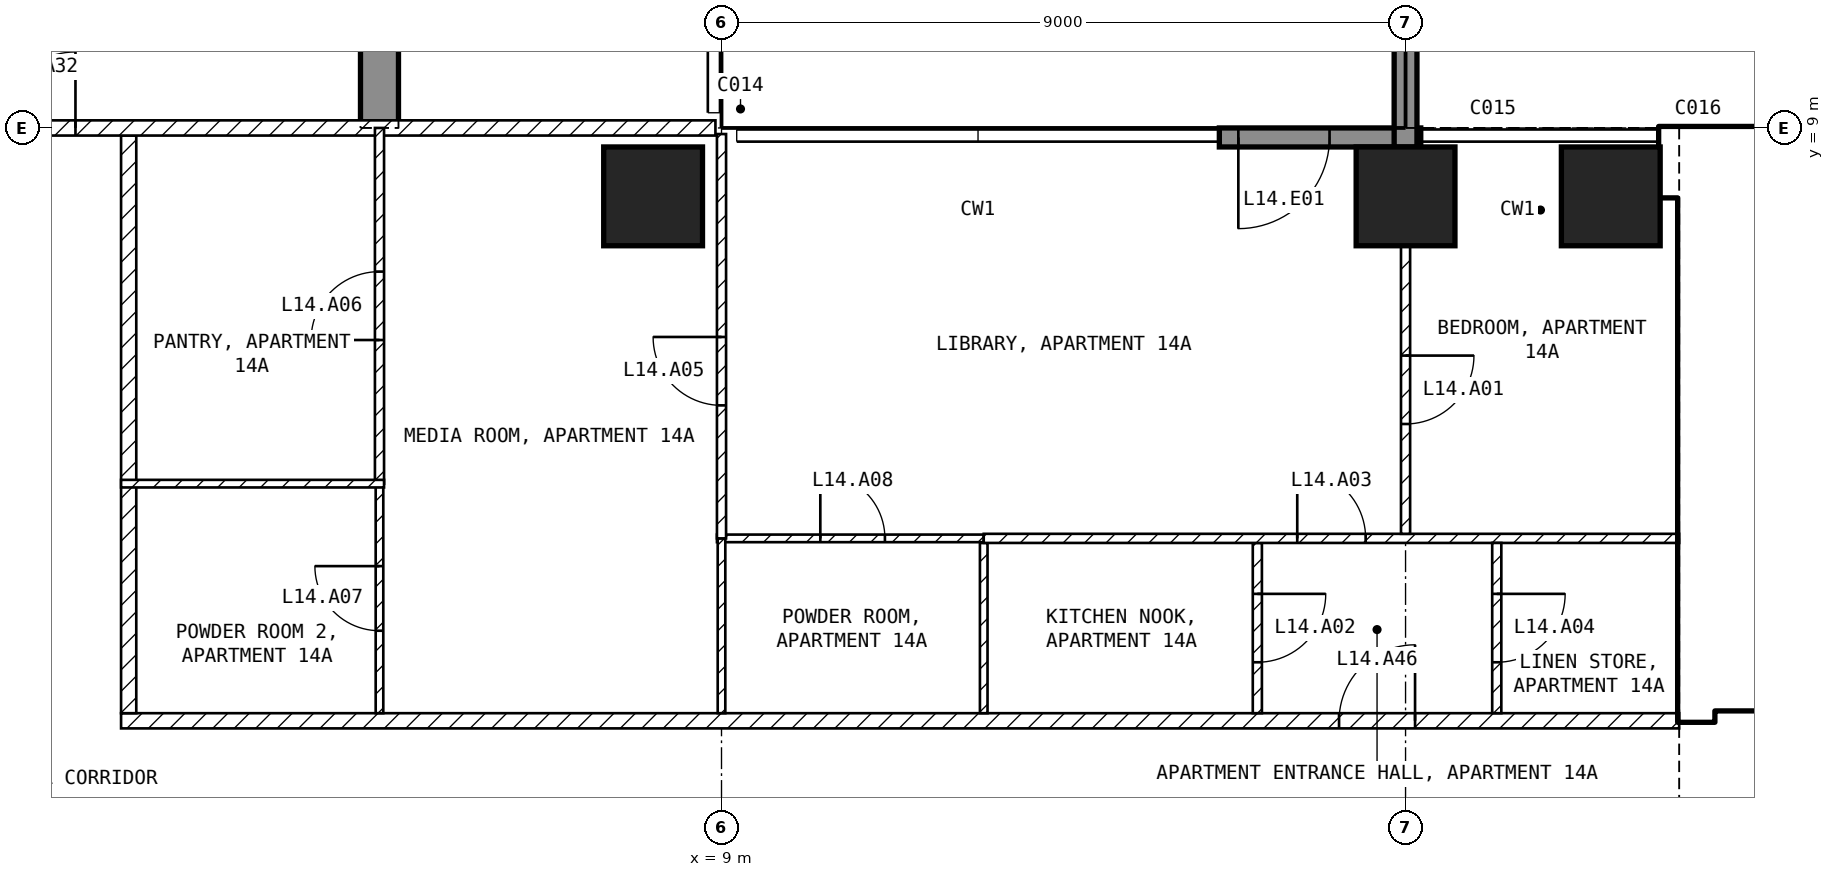
"""IFC4 building model, lengths in metres.
Left out: names, types, materials, properties, quantities, classifications, styles, units other than length and angle.
Written with IfcOpenShell. Run it as: python <this file> out.ifc"""

import sys

from ifc_helpers import new_model, si_unit, direction, frame, frame_2d, origin, origin_2d, place, context, subcontext, project, spatial, polyline, rectangle, outline, extrude, element, fill, save


model = new_model("IFC4")
c1 = context("Model", 3, precision=1e-05, world=origin(), true_north=direction((0.0, 1.0)))
c2 = subcontext(c1, "Body", "Model", "MODEL_VIEW")
j1 = project(units=[si_unit("LENGTHUNIT", "METRE"), si_unit("PLANEANGLEUNIT", "RADIAN")], contexts=[c1])
p1 = place(None, origin())
s1 = spatial("IfcSite", under=j1, at=p1, CompositionType="ELEMENT")
p2 = place(p1, origin())
s2 = spatial("IfcBuilding", under=s1, at=p2, CompositionType="ELEMENT")
p3 = place(p2, frame((0.0, 0.0, 68.0)))
s3 = spatial("IfcBuildingStorey", under=s2, at=p3, CompositionType="ELEMENT", Elevation=68.0)
for number, where, z_axis, x_axis in (
    (1, (8.1, 8.1, -0.25), (0.0, 0.0, 1.0), (1.0, 0.0, 0.0)),
    (2, (18.0, 8.1, -0.25), (0.0, 0.0, 1.0), (1.0, 0.0, 0.0)),
    (3, (20.7, 8.1, -0.25), (0.0, 0.0, 1.0), (1.0, 0.0, 0.0)),
):
    element("IfcColumn", number, at=place(p3, frame(where, z_axis=z_axis, x_axis=x_axis)), inside=s3, PredefinedType="COLUMN", context=c2, shape_type="SweptSolid", body=[
        extrude(rectangle(XDim=1.3, YDim=1.3, at=origin_2d()), origin(), (0.0, 0.0, 1.0), 3.5),
    ])
p4 = place(p3, frame((4.25, 9.0, -0.25), z_axis=(1.0, 0.0, 0.0), x_axis=(0.0, 1.0, 0.0)))
e4 = element("IfcWall", 4, at=p4, inside=s3, PredefinedType="SHEAR", context=c2, shape_type="SweptSolid", body=[
    extrude(outline(polyline([(0.0, 0.0), (2.1, 0.0), (2.1, 2.65), (4.5, 2.65), (4.5, 0.0), (9.9, 0.0), (9.9, 2.65), (12.3, 2.65), (12.3, 0.0), (16.45, 0.0), (16.45, 3.5), (0.0, 3.5), (0.0, 0.0)])), origin(), (0.0, 0.0, 1.0), 0.5),
])
p5 = place(p3, frame((18.2, 8.875, 0.0), z_axis=(0.0, 0.0, 1.0), x_axis=(-1.0, 0.0, 0.0)))
e5 = element("IfcWall", 5, at=p5, inside=s3, PredefinedType="SOLIDWALL", context=c2, shape_type="SweptSolid", body=[
    extrude(rectangle(XDim=2.65, YDim=0.25, at=frame_2d((1.325, 0.0))), origin(), (0.0, 0.0, 1.0), 3.25),
])
p6 = place(p5, frame((1.2, 0.0, 0.0)))
e6 = element("IfcOpeningElement", 6, at=p6, cuts=e5, PredefinedType="OPENING", context=c2, shape_type="SweptSolid", body=[
    extrude(rectangle(XDim=1.2, YDim=2.4, at=frame_2d((0.6, 1.2))), frame((0.0, 0.135, 0.0), z_axis=(0.0, -1.0, 0.0), x_axis=(1.0, 0.0, 0.0)), (0.0, 0.0, 1.0), 0.27),
])
p7 = place(p3, frame((18.0, 8.75, 0.0), z_axis=(0.0, 0.0, 1.0), x_axis=(0.0, 1.0, 0.0)))
e7 = element("IfcWall", 7, at=p7, inside=s3, PredefinedType="SOLIDWALL", context=c2, shape_type="SweptSolid", body=[
    extrude(rectangle(XDim=2.95, YDim=0.3, at=frame_2d((1.475, 0.0))), origin(), (0.0, 0.0, 1.0), 3.25),
])
p8 = place(p3, frame((21.35, 8.55, 0.0), z_axis=(0.0, 0.0, 1.0), x_axis=(1.0, 0.0, 0.0)))
e8 = element("IfcWall", 8, at=p8, inside=s3, PredefinedType="SHEAR", context=c2, shape_type="SweptSolid", body=[
    extrude(rectangle(XDim=10.15, YDim=0.9, at=frame_2d((5.075, 0.0))), origin(), (0.0, 0.0, 1.0), 3.25),
])
p9 = place(p3, frame((21.825, 1.2, 0.0), z_axis=(0.0, 0.0, 1.0), x_axis=(0.0, 1.0, 0.0)))
e9 = element("IfcWall", 9, at=p9, inside=s3, PredefinedType="SHEAR", context=c2, shape_type="SweptSolid", body=[
    extrude(rectangle(XDim=6.9, YDim=0.45, at=frame_2d((3.45, 0.0))), origin(), (0.0, 0.0, 1.0), 3.25),
])
p10 = place(p3, frame((22.05, 1.45, 0.0), z_axis=(0.0, 0.0, 1.0), x_axis=(1.0, 0.0, 0.0)))
e10 = element("IfcWall", 10, at=p10, inside=s3, PredefinedType="SOLIDWALL", context=c2, shape_type="SweptSolid", body=[
    extrude(rectangle(XDim=13.05, YDim=0.2, at=frame_2d((6.525, 0.0))), origin(), (0.0, 0.0, 1.0), 3.25),
])
p11 = place(p10, frame((0.75, 0.0, 0.0)))
e11 = element("IfcOpeningElement", 11, at=p11, cuts=e10, PredefinedType="OPENING", context=c2, shape_type="SweptSolid", body=[
    extrude(rectangle(XDim=1.0, YDim=2.1, at=frame_2d((0.5, 1.05))), frame((0.0, 0.11, 0.0), z_axis=(0.0, -1.0, 0.0), x_axis=(1.0, 0.0, 0.0)), (0.0, 0.0, 1.0), 0.22),
])
p12 = place(p10, frame((3.25, 0.0, 0.0)))
e12 = element("IfcOpeningElement", 12, at=p12, cuts=e10, PredefinedType="OPENING", context=c2, shape_type="SweptSolid", body=[
    extrude(rectangle(XDim=1.0, YDim=2.1, at=frame_2d((0.5, 1.05))), frame((0.0, 0.11, 0.0), z_axis=(0.0, -1.0, 0.0), x_axis=(1.0, 0.0, 0.0)), (0.0, 0.0, 1.0), 0.22),
])
p13 = place(p3, frame((22.05, 5.15, 0.0), z_axis=(0.0, 0.0, 1.0), x_axis=(1.0, 0.0, 0.0)))
e13 = element("IfcWall", 13, at=p13, inside=s3, PredefinedType="SOLIDWALL", context=c2, shape_type="SweptSolid", body=[
    extrude(rectangle(XDim=6.3, YDim=0.2, at=frame_2d((3.15, 0.0))), origin(), (0.0, 0.0, 1.0), 3.25),
])
p14 = place(p13, frame((0.2, 0.0, 0.0)))
e14 = element("IfcOpeningElement", 14, at=p14, cuts=e13, PredefinedType="OPENING", context=c2, shape_type="SweptSolid", body=[
    extrude(rectangle(XDim=1.0, YDim=2.1, at=frame_2d((0.5, 1.05))), frame((0.0, 0.11, 0.0), z_axis=(0.0, -1.0, 0.0), x_axis=(1.0, 0.0, 0.0)), (0.0, 0.0, 1.0), 0.22),
])
p15 = place(p3, frame((1.1, 1.2, 0.0), z_axis=(0.0, 0.0, 1.0), x_axis=(1.0, 0.0, 0.0)))
e15 = element("IfcWall", 15, at=p15, inside=s3, PredefinedType="PARTITIONING", context=c2, shape_type="SweptSolid", body=[
    extrude(rectangle(XDim=20.5, YDim=0.2, at=frame_2d((10.25, 0.0))), origin(), (0.0, 0.0, 1.0), 3.25),
])
p16 = place(p15, frame((16.025, 0.0, 0.0)))
e16 = element("IfcOpeningElement", 16, at=p16, cuts=e15, PredefinedType="OPENING", context=c2, shape_type="SweptSolid", body=[
    extrude(rectangle(XDim=1.0, YDim=2.1, at=frame_2d((0.5, 1.05))), frame((0.0, 0.11, 0.0), z_axis=(0.0, -1.0, 0.0), x_axis=(1.0, 0.0, 0.0)), (0.0, 0.0, 1.0), 0.22),
])
p17 = place(p3, frame((1.2, 8.9, 0.0), z_axis=(0.0, 0.0, 1.0), x_axis=(0.0, -1.0, 0.0)))
e17 = element("IfcWall", 17, at=p17, inside=s3, PredefinedType="PARTITIONING", context=c2, shape_type="SweptSolid", body=[
    extrude(rectangle(XDim=7.6, YDim=0.2, at=frame_2d((3.8, 0.0))), origin(), (0.0, 0.0, 1.0), 3.25),
])
p18 = place(p3, frame((-8.92, 9.0, 0.0), z_axis=(0.0, 0.0, 1.0), x_axis=(1.0, 0.0, 0.0)))
e18 = element("IfcWall", 18, at=p18, inside=s3, PredefinedType="PARTITIONING", context=c2, shape_type="SweptSolid", body=[
    extrude(rectangle(XDim=17.84, YDim=0.2, at=frame_2d((8.92, 0.0))), origin(), (0.0, 0.0, 1.0), 3.25),
])
p19 = place(p18, frame((8.42, 0.0, 0.0)))
e19 = element("IfcOpeningElement", 19, at=p19, cuts=e18, PredefinedType="OPENING", context=c2, shape_type="SweptSolid", body=[
    extrude(rectangle(XDim=1.0, YDim=2.1, at=frame_2d((0.5, 1.05))), frame((0.0, 0.11, 0.0), z_axis=(0.0, -1.0, 0.0), x_axis=(1.0, 0.0, 0.0)), (0.0, 0.0, 1.0), 0.22),
])
p20 = place(p3, frame((12.45, 3.54, 0.0), z_axis=(0.0, 0.0, 1.0), x_axis=(0.0, -1.0, 0.0)))
e20 = element("IfcWall", 20, at=p20, inside=s3, PredefinedType="PARTITIONING", context=c2, shape_type="SweptSolid", body=[
    extrude(rectangle(XDim=2.24, YDim=0.1, at=frame_2d((1.12, 0.0))), origin(), (0.0, 0.0, 1.0), 3.25),
])
p21 = place(p3, frame((8.94, 3.6, 0.0), z_axis=(0.0, 0.0, 1.0), x_axis=(1.0, 0.0, 0.0)))
e21 = element("IfcWall", 21, at=p21, inside=s3, PredefinedType="PARTITIONING", context=c2, shape_type="SweptSolid", body=[
    extrude(rectangle(XDim=3.51, YDim=0.1, at=frame_2d((1.755, 0.0))), origin(), (0.0, 0.0, 1.0), 3.25),
])
p22 = place(p21, frame((1.36, 0.0, 0.0)))
e22 = element("IfcOpeningElement", 22, at=p22, cuts=e21, PredefinedType="OPENING", context=c2, shape_type="SweptSolid", body=[
    extrude(rectangle(XDim=0.85, YDim=2.1, at=frame_2d((0.425, 1.05))), frame((0.0, 0.06, 0.0), z_axis=(0.0, -1.0, 0.0), x_axis=(1.0, 0.0, 0.0)), (0.0, 0.0, 1.0), 0.12),
])
p23 = place(p3, frame((9.0, 1.3, 0.0), z_axis=(0.0, 0.0, 1.0), x_axis=(0.0, 1.0, 0.0)))
e23 = element("IfcWall", 23, at=p23, inside=s3, PredefinedType="PARTITIONING", context=c2, shape_type="SweptSolid", body=[
    extrude(rectangle(XDim=2.3, YDim=0.1, at=frame_2d((1.15, 0.0))), origin(), (0.0, 0.0, 1.0), 3.25),
])
p24 = place(p3, frame((16.05, 3.54, 0.0), z_axis=(0.0, 0.0, 1.0), x_axis=(0.0, -1.0, 0.0)))
e24 = element("IfcWall", 24, at=p24, inside=s3, PredefinedType="PARTITIONING", context=c2, shape_type="SweptSolid", body=[
    extrude(rectangle(XDim=2.24, YDim=0.12, at=frame_2d((1.12, 0.0))), origin(), (0.0, 0.0, 1.0), 3.25),
])
p25 = place(p24, frame((0.67, 0.0, 0.0)))
e25 = element("IfcOpeningElement", 25, at=p25, cuts=e24, PredefinedType="OPENING", context=c2, shape_type="SweptSolid", body=[
    extrude(rectangle(XDim=0.9, YDim=2.1, at=frame_2d((0.45, 1.05))), frame((0.0, 0.07, 0.0), z_axis=(0.0, -1.0, 0.0), x_axis=(1.0, 0.0, 0.0)), (0.0, 0.0, 1.0), 0.14),
])
p26 = place(p3, frame((12.45, 3.6, 0.0), z_axis=(0.0, 0.0, 1.0), x_axis=(1.0, 0.0, 0.0)))
e26 = element("IfcWall", 26, at=p26, inside=s3, PredefinedType="PARTITIONING", context=c2, shape_type="SweptSolid", body=[
    extrude(rectangle(XDim=9.15, YDim=0.12, at=frame_2d((4.575, 0.0))), origin(), (0.0, 0.0, 1.0), 3.25),
])
p27 = place(p26, frame((4.125, 0.0, 0.0)))
e27 = element("IfcOpeningElement", 27, at=p27, cuts=e26, PredefinedType="OPENING", context=c2, shape_type="SweptSolid", body=[
    extrude(rectangle(XDim=0.9, YDim=2.1, at=frame_2d((0.45, 1.05))), frame((0.0, 0.07, 0.0), z_axis=(0.0, -1.0, 0.0), x_axis=(1.0, 0.0, 0.0)), (0.0, 0.0, 1.0), 0.14),
])
p28 = place(p3, frame((19.2, 3.54, 0.0), z_axis=(0.0, 0.0, 1.0), x_axis=(0.0, -1.0, 0.0)))
e28 = element("IfcWall", 28, at=p28, inside=s3, PredefinedType="PARTITIONING", context=c2, shape_type="SweptSolid", body=[
    extrude(rectangle(XDim=2.24, YDim=0.12, at=frame_2d((1.12, 0.0))), origin(), (0.0, 0.0, 1.0), 3.25),
])
p29 = place(p28, frame((0.67, 0.0, 0.0)))
e29 = element("IfcOpeningElement", 29, at=p29, cuts=e28, PredefinedType="OPENING", context=c2, shape_type="SweptSolid", body=[
    extrude(rectangle(XDim=0.9, YDim=2.1, at=frame_2d((0.45, 1.05))), frame((0.0, 0.07, 0.0), z_axis=(0.0, -1.0, 0.0), x_axis=(1.0, 0.0, 0.0)), (0.0, 0.0, 1.0), 0.14),
])
p30 = place(p3, frame((18.0, 7.45, 0.0), z_axis=(0.0, 0.0, 1.0), x_axis=(0.0, -1.0, 0.0)))
e30 = element("IfcWall", 30, at=p30, inside=s3, PredefinedType="PARTITIONING", context=c2, shape_type="SweptSolid", body=[
    extrude(rectangle(XDim=3.79, YDim=0.12, at=frame_2d((1.895, 0.0))), origin(), (0.0, 0.0, 1.0), 2.346),
])
p31 = place(p30, frame((1.445, 0.0, 0.0)))
e31 = element("IfcOpeningElement", 31, at=p31, cuts=e30, PredefinedType="OPENING", context=c2, shape_type="SweptSolid", body=[
    extrude(rectangle(XDim=0.9, YDim=2.1, at=frame_2d((0.45, 1.05))), frame((0.0, 0.07, 0.0), z_axis=(0.0, -1.0, 0.0), x_axis=(1.0, 0.0, 0.0)), (0.0, 0.0, 1.0), 0.14),
])
p32 = place(p3, frame((9.0, 3.6, 0.0), z_axis=(0.0, 0.0, 1.0), x_axis=(0.0, 1.0, 0.0)))
e32 = element("IfcWall", 32, at=p32, inside=s3, PredefinedType="PARTITIONING", context=c2, shape_type="SweptSolid", body=[
    extrude(rectangle(XDim=5.32, YDim=0.12, at=frame_2d((2.66, 0.0))), origin(), (0.0, 0.0, 1.0), 3.25),
])
p33 = place(p32, frame((1.75, 0.0, 0.0)))
e33 = element("IfcOpeningElement", 33, at=p33, cuts=e32, PredefinedType="OPENING", context=c2, shape_type="SweptSolid", body=[
    extrude(rectangle(XDim=0.9, YDim=2.1, at=frame_2d((0.45, 1.05))), frame((0.0, 0.07, 0.0), z_axis=(0.0, -1.0, 0.0), x_axis=(1.0, 0.0, 0.0)), (0.0, 0.0, 1.0), 0.14),
])
p34 = place(p3, frame((4.5, 1.3, 0.0), z_axis=(0.0, 0.0, 1.0), x_axis=(0.0, 1.0, 0.0)))
e34 = element("IfcWall", 34, at=p34, inside=s3, PredefinedType="PARTITIONING", context=c2, shape_type="SweptSolid", body=[
    extrude(rectangle(XDim=3.02, YDim=0.1, at=frame_2d((1.51, 0.0))), origin(), (0.0, 0.0, 1.0), 3.25),
])
p35 = place(p34, frame((1.085, 0.0, 0.0)))
e35 = element("IfcOpeningElement", 35, at=p35, cuts=e34, PredefinedType="OPENING", context=c2, shape_type="SweptSolid", body=[
    extrude(rectangle(XDim=0.85, YDim=2.1, at=frame_2d((0.425, 1.05))), frame((0.0, 0.06, 0.0), z_axis=(0.0, -1.0, 0.0), x_axis=(1.0, 0.0, 0.0)), (0.0, 0.0, 1.0), 0.12),
])
p36 = place(p3, frame((4.5, 4.32, 0.0), z_axis=(0.0, 0.0, 1.0), x_axis=(0.0, 1.0, 0.0)))
e36 = element("IfcWall", 36, at=p36, inside=s3, PredefinedType="PARTITIONING", context=c2, shape_type="SweptSolid", body=[
    extrude(rectangle(XDim=4.68, YDim=0.12, at=frame_2d((2.34, 0.0))), origin(), (0.0, 0.0, 1.0), 3.25),
])
p37 = place(p36, frame((1.89, 0.0, 0.0)))
e37 = element("IfcOpeningElement", 37, at=p37, cuts=e36, PredefinedType="OPENING", context=c2, shape_type="SweptSolid", body=[
    extrude(rectangle(XDim=0.9, YDim=2.1, at=frame_2d((0.45, 1.05))), frame((0.0, 0.07, 0.0), z_axis=(0.0, -1.0, 0.0), x_axis=(1.0, 0.0, 0.0)), (0.0, 0.0, 1.0), 0.14),
])
p38 = place(p3, frame((1.1, 4.32, 0.0), z_axis=(0.0, 0.0, 1.0), x_axis=(1.0, 0.0, 0.0)))
e38 = element("IfcWall", 38, at=p38, inside=s3, PredefinedType="PARTITIONING", context=c2, shape_type="SweptSolid", body=[
    extrude(rectangle(XDim=3.46, YDim=0.1, at=frame_2d((1.73, 0.0))), origin(), (0.0, 0.0, 1.0), 3.25),
])
p39 = place(p6, origin())
e39 = element("IfcDoor", 39, at=p39, inside=s3, OperationType="SINGLE_SWING_RIGHT", PredefinedType="DOOR", context=c2, shape_type="SweptSolid", body=[
    extrude(rectangle(XDim=1.2, YDim=2.4, at=frame_2d((0.6, 1.2))), frame((0.0, 0.025, 0.0), z_axis=(0.0, -1.0, 0.0), x_axis=(1.0, 0.0, 0.0)), (0.0, 0.0, 1.0), 0.05),
])
fill(e6, e39)
p40 = place(p14, origin())
e40 = element("IfcDoor", 40, at=p40, inside=s3, OperationType="SINGLE_SWING_LEFT", PredefinedType="DOOR", context=c2, shape_type="SweptSolid", body=[
    extrude(rectangle(XDim=1.0, YDim=2.1, at=frame_2d((0.5, 1.05))), frame((0.0, 0.025, 0.0), z_axis=(0.0, -1.0, 0.0), x_axis=(1.0, 0.0, 0.0)), (0.0, 0.0, 1.0), 0.05),
])
fill(e14, e40)
p41 = place(p31, origin())
e41 = element("IfcDoor", 41, at=p41, inside=s3, OperationType="SINGLE_SWING_LEFT", PredefinedType="DOOR", context=c2, shape_type="SweptSolid", body=[
    extrude(rectangle(XDim=0.9, YDim=2.1, at=frame_2d((0.45, 1.05))), frame((0.0, 0.025, 0.0), z_axis=(0.0, -1.0, 0.0), x_axis=(1.0, 0.0, 0.0)), (0.0, 0.0, 1.0), 0.05),
])
fill(e31, e41)
p42 = place(p25, origin())
e42 = element("IfcDoor", 42, at=p42, inside=s3, OperationType="SINGLE_SWING_LEFT", PredefinedType="DOOR", context=c2, shape_type="SweptSolid", body=[
    extrude(rectangle(XDim=0.9, YDim=2.1, at=frame_2d((0.45, 1.05))), frame((0.0, 0.025, 0.0), z_axis=(0.0, -1.0, 0.0), x_axis=(1.0, 0.0, 0.0)), (0.0, 0.0, 1.0), 0.05),
])
fill(e25, e42)
p43 = place(p27, origin())
e43 = element("IfcDoor", 43, at=p43, inside=s3, OperationType="SINGLE_SWING_LEFT", PredefinedType="DOOR", context=c2, shape_type="SweptSolid", body=[
    extrude(rectangle(XDim=0.9, YDim=2.1, at=frame_2d((0.45, 1.05))), frame((0.0, 0.025, 0.0), z_axis=(0.0, -1.0, 0.0), x_axis=(1.0, 0.0, 0.0)), (0.0, 0.0, 1.0), 0.05),
])
fill(e27, e43)
p44 = place(p29, origin())
e44 = element("IfcDoor", 44, at=p44, inside=s3, OperationType="SINGLE_SWING_LEFT", PredefinedType="DOOR", context=c2, shape_type="SweptSolid", body=[
    extrude(rectangle(XDim=0.9, YDim=2.1, at=frame_2d((0.45, 1.05))), frame((0.0, 0.025, 0.0), z_axis=(0.0, -1.0, 0.0), x_axis=(1.0, 0.0, 0.0)), (0.0, 0.0, 1.0), 0.05),
])
fill(e29, e44)
p45 = place(p33, origin())
e45 = element("IfcDoor", 45, at=p45, inside=s3, OperationType="SINGLE_SWING_RIGHT", PredefinedType="DOOR", context=c2, shape_type="SweptSolid", body=[
    extrude(rectangle(XDim=0.9, YDim=2.1, at=frame_2d((0.45, 1.05))), frame((0.0, 0.025, 0.0), z_axis=(0.0, -1.0, 0.0), x_axis=(1.0, 0.0, 0.0)), (0.0, 0.0, 1.0), 0.05),
])
fill(e33, e45)
p46 = place(p37, origin())
e46 = element("IfcDoor", 46, at=p46, inside=s3, OperationType="SINGLE_SWING_LEFT", PredefinedType="DOOR", context=c2, shape_type="SweptSolid", body=[
    extrude(rectangle(XDim=0.9, YDim=2.1, at=frame_2d((0.45, 1.05))), frame((0.0, 0.025, 0.0), z_axis=(0.0, -1.0, 0.0), x_axis=(1.0, 0.0, 0.0)), (0.0, 0.0, 1.0), 0.05),
])
fill(e37, e46)
p47 = place(p35, origin())
e47 = element("IfcDoor", 47, at=p47, inside=s3, OperationType="SINGLE_SWING_RIGHT", PredefinedType="DOOR", context=c2, shape_type="SweptSolid", body=[
    extrude(rectangle(XDim=0.85, YDim=2.1, at=frame_2d((0.425, 1.05))), frame((0.0, 0.025, 0.0), z_axis=(0.0, -1.0, 0.0), x_axis=(1.0, 0.0, 0.0)), (0.0, 0.0, 1.0), 0.05),
])
fill(e35, e47)
p48 = place(p22, origin())
e48 = element("IfcDoor", 48, at=p48, inside=s3, OperationType="SINGLE_SWING_LEFT", PredefinedType="DOOR", context=c2, shape_type="SweptSolid", body=[
    extrude(rectangle(XDim=0.85, YDim=2.1, at=frame_2d((0.425, 1.05))), frame((0.0, 0.025, 0.0), z_axis=(0.0, -1.0, 0.0), x_axis=(1.0, 0.0, 0.0)), (0.0, 0.0, 1.0), 0.05),
])
fill(e22, e48)
p49 = place(p19, origin())
e49 = element("IfcDoor", 49, at=p49, inside=s3, OperationType="SINGLE_SWING_RIGHT", PredefinedType="DOOR", context=c2, shape_type="SweptSolid", body=[
    extrude(rectangle(XDim=1.0, YDim=2.1, at=frame_2d((0.5, 1.05))), frame((0.0, 0.025, 0.0), z_axis=(0.0, -1.0, 0.0), x_axis=(1.0, 0.0, 0.0)), (0.0, 0.0, 1.0), 0.05),
])
fill(e19, e49)
p50 = place(p16, origin())
e50 = element("IfcDoor", 50, at=p50, inside=s3, OperationType="SINGLE_SWING_RIGHT", PredefinedType="DOOR", context=c2, shape_type="SweptSolid", body=[
    extrude(rectangle(XDim=1.0, YDim=2.1, at=frame_2d((0.5, 1.05))), frame((0.0, 0.025, 0.0), z_axis=(0.0, -1.0, 0.0), x_axis=(1.0, 0.0, 0.0)), (0.0, 0.0, 1.0), 0.05),
])
fill(e16, e50)
save(model, sys.argv[1])
